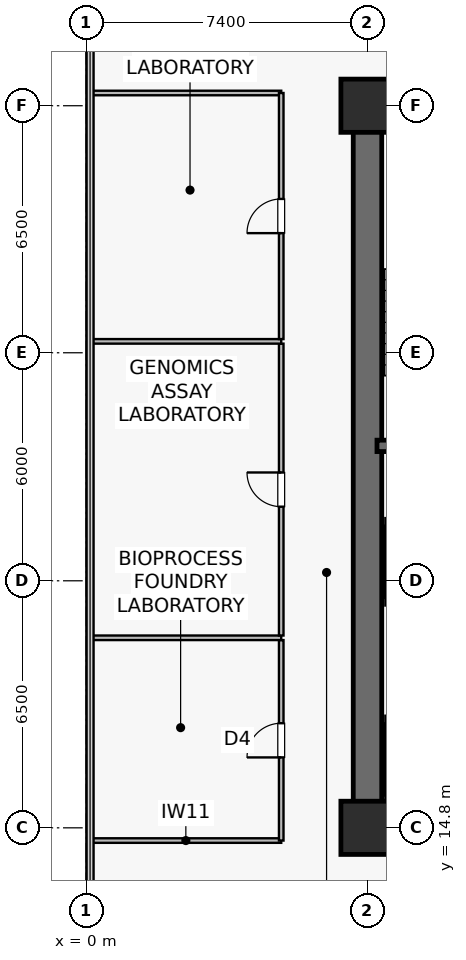
"""IFC4 building model, lengths in metres.
Left out: names, types, materials, properties, quantities, classifications, styles, units other than length and angle.
Written with IfcOpenShell. Run it as: python <this file> out.ifc"""

import sys

from ifc_helpers import new_model, si_unit, direction, frame, frame_2d, origin, origin_2d, place, context, subcontext, project, spatial, rectangle, extrude, source, transform, mapped, element, fill, save


model = new_model("IFC4")
c1 = context("Model", 3, precision=1e-05, world=origin(), true_north=direction((0.0, 1.0)))
c2 = subcontext(c1, "Body", "Model", "MODEL_VIEW")
j1 = project(units=[si_unit("LENGTHUNIT", "METRE"), si_unit("PLANEANGLEUNIT", "RADIAN")], contexts=[c1])
p1 = place(None, origin())
s1 = spatial("IfcSite", under=j1, at=p1, CompositionType="ELEMENT")
p2 = place(p1, origin())
s2 = spatial("IfcBuilding", under=s1, at=p2, CompositionType="ELEMENT")
p3 = place(p2, frame((0.0, 0.0, 33.4)))
s3 = spatial("IfcBuildingStorey", under=s2, at=p3, CompositionType="ELEMENT", Elevation=33.4)
p4 = place(p3, frame((7.025, 14.8, 0.0), z_axis=(0.0, 0.0, 1.0), x_axis=(1.0, 0.0, 0.0)))
e1 = element("IfcWall", 1, at=p4, inside=s3, PredefinedType="SHEAR", context=c2, shape_type="SweptSolid", body=[
    extrude(rectangle(XDim=15.55, YDim=0.75, at=frame_2d((7.775, 0.0))), origin(), (0.0, 0.0, 1.0), 3.78),
])
p5 = place(p3, frame((7.025, 33.8, 0.0), z_axis=(0.0, 0.0, 1.0), x_axis=(1.0, 0.0, 0.0)))
e2 = element("IfcWall", 2, at=p5, inside=s3, PredefinedType="SHEAR", context=c2, shape_type="SweptSolid", body=[
    extrude(rectangle(XDim=15.55, YDim=0.75, at=frame_2d((7.775, 0.0))), origin(), (0.0, 0.0, 1.0), 3.78),
])
p6 = place(p5, frame((5.3, 0.0, 0.0)))
e3 = element("IfcOpeningElement", 3, at=p6, cuts=e2, PredefinedType="OPENING", context=c2, shape_type="SweptSolid", body=[
    extrude(rectangle(XDim=0.95, YDim=2.15, at=frame_2d((0.475, 1.075))), frame((0.0, 0.385, 0.0), z_axis=(0.0, -1.0, 0.0), x_axis=(1.0, 0.0, 0.0)), (0.0, 0.0, 1.0), 0.77),
])
p7 = place(p5, frame((7.815, 0.0, 0.0)))
e4 = element("IfcOpeningElement", 4, at=p7, cuts=e2, PredefinedType="OPENING", context=c2, shape_type="SweptSolid", body=[
    extrude(rectangle(XDim=0.95, YDim=2.15, at=frame_2d((0.475, 1.075))), frame((0.0, 0.385, 0.0), z_axis=(0.0, -1.0, 0.0), x_axis=(1.0, 0.0, 0.0)), (0.0, 0.0, 1.0), 0.77),
])
p8 = place(p5, frame((10.365, 0.0, 0.0)))
e5 = element("IfcOpeningElement", 5, at=p8, cuts=e2, PredefinedType="OPENING", context=c2, shape_type="SweptSolid", body=[
    extrude(rectangle(XDim=0.95, YDim=2.15, at=frame_2d((0.475, 1.075))), frame((0.0, 0.385, 0.0), z_axis=(0.0, -1.0, 0.0), x_axis=(1.0, 0.0, 0.0)), (0.0, 0.0, 1.0), 0.77),
])
p9 = place(p5, frame((12.915, 0.0, 0.0)))
e6 = element("IfcOpeningElement", 6, at=p9, cuts=e2, PredefinedType="OPENING", context=c2, shape_type="SweptSolid", body=[
    extrude(rectangle(XDim=0.95, YDim=2.15, at=frame_2d((0.475, 1.075))), frame((0.0, 0.385, 0.0), z_axis=(0.0, -1.0, 0.0), x_axis=(1.0, 0.0, 0.0)), (0.0, 0.0, 1.0), 0.77),
])
p10 = place(p3, frame((7.4, 15.175, 0.0), z_axis=(0.0, 0.0, 1.0), x_axis=(0.0, 1.0, 0.0)))
e7 = element("IfcWall", 7, at=p10, inside=s3, PredefinedType="SHEAR", context=c2, shape_type="SweptSolid", body=[
    extrude(rectangle(XDim=18.25, YDim=0.75, at=frame_2d((9.125, 0.0))), origin(), (0.0, 0.0, 1.0), 3.78),
])
p11 = place(p3, frame((7.65, 24.85, 0.0), z_axis=(0.0, 0.0, 1.0), x_axis=(1.0, 0.0, 0.0)))
e8 = element("IfcWall", 8, at=p11, inside=s3, PredefinedType="SHEAR", context=c2, shape_type="SweptSolid", body=[
    extrude(rectangle(XDim=3.8, YDim=0.3, at=frame_2d((1.9, 0.0))), origin(), (0.0, 0.0, 1.0), 3.78),
])
p12 = place(p3, frame((7.73, 33.4, 0.0), z_axis=(0.0, 0.0, 1.0), x_axis=(1.0, 0.0, 0.0)))
e9 = element("IfcWall", 9, at=p12, inside=s3, PredefinedType="SOLIDWALL", context=c2, shape_type="SweptSolid", body=[
    extrude(rectangle(XDim=3.72, YDim=0.12, at=frame_2d((1.86, 0.0))), origin(), (0.0, 0.0, 1.0), 3.78),
])
m1 = source(origin(), c2, "Body", "SweptSolid", [
    extrude(rectangle(XDim=1.4, YDim=1.4, at=origin_2d()), origin(), (0.0, 0.0, 1.0), 4.1),
])
for number, where, z_axis, x_axis in (
    (10, (7.4, 14.8, 0.0), (0.0, 0.0, 1.0), (1.0, 0.0, 0.0)),
    (11, (7.4, 33.8, 0.0), (0.0, 0.0, 1.0), (1.0, 0.0, 0.0)),
):
    element("IfcColumn", number, at=place(p3, frame(where, z_axis=z_axis, x_axis=x_axis)), inside=s3, PredefinedType="COLUMN", context=c2, shape_type="MappedRepresentation", body=[
        mapped(m1, transform((0.0, 0.0, 0.0), scale=1.0)),
    ])
p13 = place(p3, frame((7.87, 17.65, 0.0), z_axis=(0.0, 0.0, 1.0), x_axis=(1.0, 0.0, 0.0)))
e12 = element("IfcWall", 12, at=p13, inside=s3, PredefinedType="SOLIDWALL", context=c2, shape_type="SweptSolid", body=[
    extrude(rectangle(XDim=2.26, YDim=0.2, at=frame_2d((1.13, 0.0))), origin(), (0.0, 0.0, 1.0), 3.78),
])
p14 = place(p13, frame((0.58, 0.0, 0.0)))
e13 = element("IfcOpeningElement", 13, at=p14, cuts=e12, PredefinedType="OPENING", context=c2, shape_type="SweptSolid", body=[
    extrude(rectangle(XDim=1.1, YDim=2.22, at=frame_2d((0.55, 1.11))), frame((0.0, 0.11, 0.0), z_axis=(0.0, -1.0, 0.0), x_axis=(1.0, 0.0, 0.0)), (0.0, 0.0, 1.0), 0.22),
])
p15 = place(p3, frame((7.87, 15.55, 0.0), z_axis=(0.0, 0.0, 1.0), x_axis=(1.0, 0.0, 0.0)))
e14 = element("IfcWall", 14, at=p15, inside=s3, PredefinedType="SOLIDWALL", context=c2, shape_type="SweptSolid", body=[
    extrude(rectangle(XDim=2.26, YDim=0.2, at=frame_2d((1.13, 0.0))), origin(), (0.0, 0.0, 1.0), 3.78),
])
p16 = place(p3, frame((7.95, 15.65, 0.0), z_axis=(0.0, 0.0, 1.0), x_axis=(0.0, 1.0, 0.0)))
e15 = element("IfcWall", 15, at=p16, inside=s3, PredefinedType="SOLIDWALL", context=c2, shape_type="SweptSolid", body=[
    extrude(rectangle(XDim=1.9, YDim=0.18, at=frame_2d((0.95, 0.0))), origin(), (0.0, 0.0, 1.0), 3.78),
])
for number, where, z_axis, x_axis in (
    (16, (7.87, 20.75, 0.0), (0.0, 0.0, 1.0), (1.0, 0.0, 0.0)),
    (17, (7.87, 22.85, 0.0), (0.0, 0.0, 1.0), (1.0, 0.0, 0.0)),
):
    element("IfcWall", number, at=place(p3, frame(where, z_axis=z_axis, x_axis=x_axis)), inside=s3, PredefinedType="SOLIDWALL", context=c2, shape_type="SweptSolid", body=[
        extrude(rectangle(XDim=2.26, YDim=0.2, at=frame_2d((1.13, 0.0))), origin(), (0.0, 0.0, 1.0), 3.78),
    ])
p17 = place(p3, frame((7.95, 20.85, 0.0), z_axis=(0.0, 0.0, 1.0), x_axis=(0.0, 1.0, 0.0)))
e18 = element("IfcWall", 18, at=p17, inside=s3, PredefinedType="SOLIDWALL", context=c2, shape_type="SweptSolid", body=[
    extrude(rectangle(XDim=1.9, YDim=0.18, at=frame_2d((0.95, 0.0))), origin(), (0.0, 0.0, 1.0), 3.78),
])
for number, where, z_axis, x_axis in (
    (19, (0.11, 14.465, 0.0), (0.0, 0.0, 1.0), (1.0, 0.0, 0.0)),
    (20, (0.11, 34.135, 0.0), (0.0, 0.0, 1.0), (1.0, 0.0, 0.0)),
):
    element("IfcWall", number, at=place(p3, frame(where, z_axis=z_axis, x_axis=x_axis)), inside=s3, PredefinedType="PARTITIONING", context=c2, shape_type="SweptSolid", body=[
        extrude(rectangle(XDim=5.02, YDim=0.12, at=frame_2d((2.51, 0.0))), origin(), (0.0, 0.0, 1.0), 3.78),
    ])
p18 = place(p3, frame((5.13, 14.465, 0.0), z_axis=(0.0, 0.0, 1.0), x_axis=(0.0, 1.0, 0.0)))
e21 = element("IfcWall", 21, at=p18, inside=s3, PredefinedType="PARTITIONING", context=c2, shape_type="SweptSolid", body=[
    extrude(rectangle(XDim=5.275, YDim=0.12, at=frame_2d((2.637, 0.0))), origin(), (0.0, 0.0, 1.0), 3.78),
])
p19 = place(p18, frame((2.188, 0.0, 0.0)))
e22 = element("IfcOpeningElement", 22, at=p19, cuts=e21, PredefinedType="OPENING", context=c2, shape_type="SweptSolid", body=[
    extrude(rectangle(XDim=0.9, YDim=2.1, at=frame_2d((0.45, 1.05))), frame((0.0, 0.07, 0.0), z_axis=(0.0, -1.0, 0.0), x_axis=(1.0, 0.0, 0.0)), (0.0, 0.0, 1.0), 0.14),
])
p20 = place(p3, frame((0.11, 19.8, 0.0), z_axis=(0.0, 0.0, 1.0), x_axis=(1.0, 0.0, 0.0)))
e23 = element("IfcWall", 23, at=p20, inside=s3, PredefinedType="PARTITIONING", context=c2, shape_type="SweptSolid", body=[
    extrude(rectangle(XDim=5.02, YDim=0.12, at=frame_2d((2.51, 0.0))), origin(), (0.0, 0.0, 1.0), 3.78),
])
p21 = place(p3, frame((5.13, 19.86, 0.0), z_axis=(0.0, 0.0, 1.0), x_axis=(0.0, 1.0, 0.0)))
e24 = element("IfcWall", 24, at=p21, inside=s3, PredefinedType="PARTITIONING", context=c2, shape_type="SweptSolid", body=[
    extrude(rectangle(XDim=7.68, YDim=0.12, at=frame_2d((3.84, 0.0))), origin(), (0.0, 0.0, 1.0), 3.78),
])
p22 = place(p21, frame((3.39, 0.0, 0.0)))
e25 = element("IfcOpeningElement", 25, at=p22, cuts=e24, PredefinedType="OPENING", context=c2, shape_type="SweptSolid", body=[
    extrude(rectangle(XDim=0.9, YDim=2.1, at=frame_2d((0.45, 1.05))), frame((0.0, 0.07, 0.0), z_axis=(0.0, -1.0, 0.0), x_axis=(1.0, 0.0, 0.0)), (0.0, 0.0, 1.0), 0.14),
])
p23 = place(p3, frame((0.11, 27.6, 0.0), z_axis=(0.0, 0.0, 1.0), x_axis=(1.0, 0.0, 0.0)))
e26 = element("IfcWall", 26, at=p23, inside=s3, PredefinedType="PARTITIONING", context=c2, shape_type="SweptSolid", body=[
    extrude(rectangle(XDim=5.02, YDim=0.12, at=frame_2d((2.51, 0.0))), origin(), (0.0, 0.0, 1.0), 3.78),
])
p24 = place(p3, frame((5.13, 27.66, 0.0), z_axis=(0.0, 0.0, 1.0), x_axis=(0.0, 1.0, 0.0)))
e27 = element("IfcWall", 27, at=p24, inside=s3, PredefinedType="PARTITIONING", context=c2, shape_type="SweptSolid", body=[
    extrude(rectangle(XDim=6.475, YDim=0.12, at=frame_2d((3.238, 0.0))), origin(), (0.0, 0.0, 1.0), 3.78),
])
p25 = place(p24, frame((2.788, 0.0, 0.0)))
e28 = element("IfcOpeningElement", 28, at=p25, cuts=e27, PredefinedType="OPENING", context=c2, shape_type="SweptSolid", body=[
    extrude(rectangle(XDim=0.9, YDim=2.1, at=frame_2d((0.45, 1.05))), frame((0.0, 0.07, 0.0), z_axis=(0.0, -1.0, 0.0), x_axis=(1.0, 0.0, 0.0)), (0.0, 0.0, 1.0), 0.14),
])
m2 = source(origin(), c2, "Body", "SweptSolid", [
    extrude(rectangle(XDim=0.9, YDim=2.1, at=frame_2d((0.45, 1.05))), frame((0.0, 0.025, 0.0), z_axis=(0.0, -1.0, 0.0), x_axis=(1.0, 0.0, 0.0)), (0.0, 0.0, 1.0), 0.05),
])
p26 = place(p19, origin())
e29 = element("IfcDoor", 29, at=p26, inside=s3, OperationType="SINGLE_SWING_LEFT", PredefinedType="DOOR", context=c2, shape_type="MappedRepresentation", body=[
    mapped(m2, transform((0.0, 0.0, 0.0), scale=1.0)),
])
fill(e22, e29)
p27 = place(p22, origin())
e30 = element("IfcDoor", 30, at=p27, inside=s3, OperationType="SINGLE_SWING_RIGHT", PredefinedType="DOOR", context=c2, shape_type="MappedRepresentation", body=[
    mapped(m2, transform((0.0, 0.0, 0.0), scale=1.0)),
])
fill(e25, e30)
p28 = place(p25, origin())
e31 = element("IfcDoor", 31, at=p28, inside=s3, OperationType="SINGLE_SWING_LEFT", PredefinedType="DOOR", context=c2, shape_type="MappedRepresentation", body=[
    mapped(m2, transform((0.0, 0.0, 0.0), scale=1.0)),
])
fill(e28, e31)
save(model, sys.argv[1])
